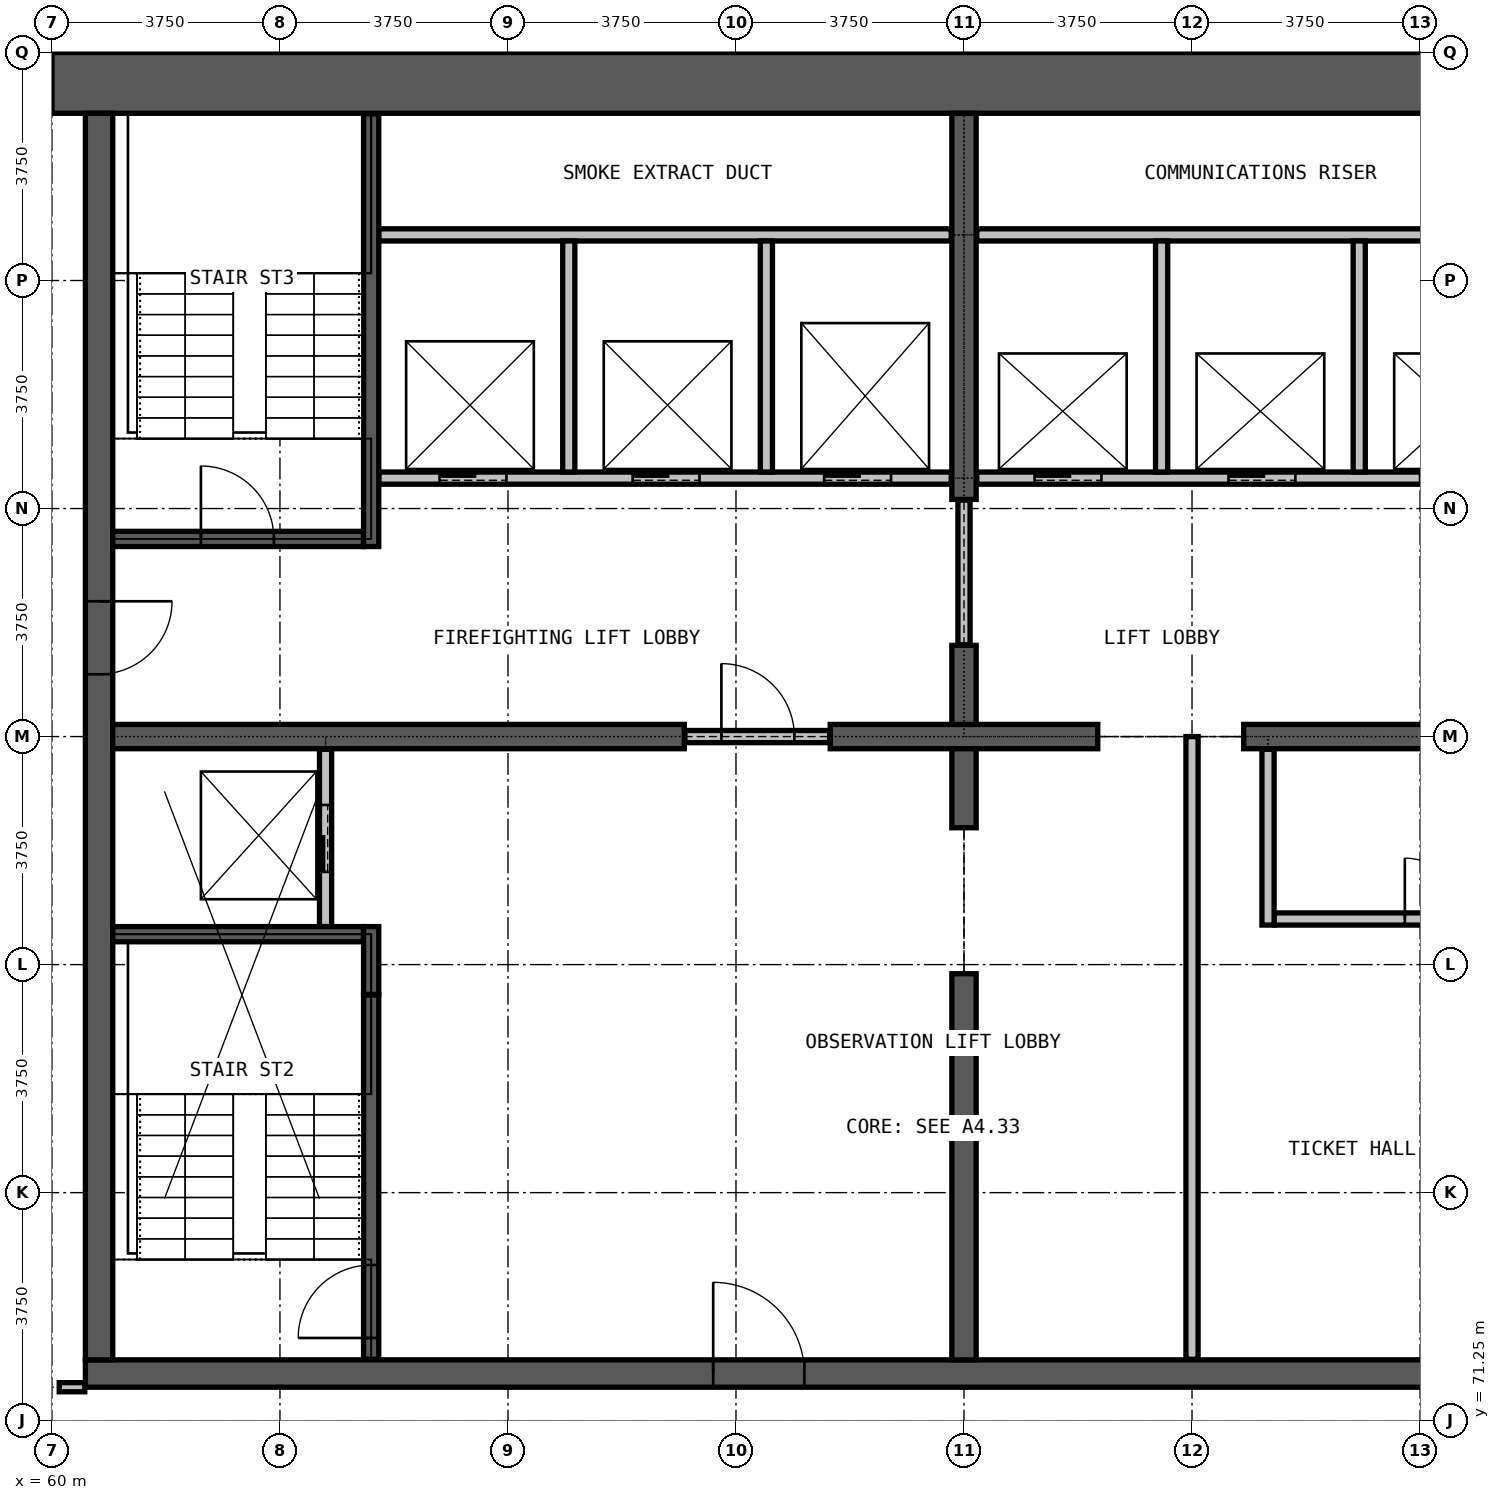
"""IFC4 building model, lengths in metres.
Left out: names, types, materials, properties, quantities, classifications, styles, units other than length and angle.
Written with IfcOpenShell. Run it as: python <this file> out.ifc"""

import sys

from ifc_helpers import new_model, si_unit, direction, frame, frame_2d, origin, place, context, subcontext, project, spatial, rectangle, extrude, element, fill, save


model = new_model("IFC4")
c1 = context("Model", 3, precision=1e-05, world=origin(), true_north=direction((0.0, 1.0)))
c2 = subcontext(c1, "Body", "Model", "MODEL_VIEW")
j1 = project(units=[si_unit("LENGTHUNIT", "METRE"), si_unit("PLANEANGLEUNIT", "RADIAN")], contexts=[c1])
p1 = place(None, origin())
s1 = spatial("IfcSite", under=j1, at=p1, CompositionType="ELEMENT")
p2 = place(p1, origin())
s2 = spatial("IfcBuilding", under=s1, at=p2, CompositionType="ELEMENT")
p3 = place(p2, frame((0.0, 0.0, 287.7)))
s3 = spatial("IfcBuildingStorey", under=s2, at=p3, CompositionType="ELEMENT", Elevation=287.7)
p4 = place(p3, frame((60.55, 72.025, 0.0), z_axis=(0.0, 0.0, 1.0), x_axis=(1.0, 0.0, 0.0)))
e1 = element("IfcWall", 1, at=p4, inside=s3, PredefinedType="SHEAR", context=c2, shape_type="SweptSolid", body=[
    extrude(rectangle(XDim=28.9, YDim=0.45, at=frame_2d((14.45, 0.0))), origin(), (0.0, 0.0, 1.0), 5.0),
])
p5 = place(p4, frame((10.325, 0.0, 0.0)))
e2 = element("IfcOpeningElement", 2, at=p5, cuts=e1, PredefinedType="OPENING", context=c2, shape_type="SweptSolid", body=[
    extrude(rectangle(XDim=1.5, YDim=2.2, at=frame_2d((0.75, 1.1))), frame((0.0, 0.235, 0.0), z_axis=(0.0, -1.0, 0.0), x_axis=(1.0, 0.0, 0.0)), (0.0, 0.0, 1.0), 0.47),
])
p6 = place(p3, frame((90.0, 93.25, 0.0), z_axis=(0.0, 0.0, 1.0), x_axis=(-1.0, 0.0, 0.0)))
e3 = element("IfcWall", 3, at=p6, inside=s3, PredefinedType="SHEAR", context=c2, shape_type="SweptSolid", body=[
    extrude(rectangle(XDim=30.0, YDim=1.0, at=frame_2d((15.0, 0.0))), origin(), (0.0, 0.0, 1.0), 5.0),
])
p7 = place(p3, frame((60.775, 92.75, 0.0), z_axis=(0.0, 0.0, 1.0), x_axis=(0.0, -1.0, 0.0)))
e4 = element("IfcWall", 4, at=p7, inside=s3, PredefinedType="SHEAR", context=c2, shape_type="SweptSolid", body=[
    extrude(rectangle(XDim=20.5, YDim=0.45, at=frame_2d((10.25, 0.0))), origin(), (0.0, 0.0, 1.0), 5.0),
])
p8 = place(p7, frame((8.025, 0.0, 0.0)))
e5 = element("IfcOpeningElement", 5, at=p8, cuts=e4, PredefinedType="OPENING", context=c2, shape_type="SweptSolid", body=[
    extrude(rectangle(XDim=1.2, YDim=2.2, at=frame_2d((0.6, 1.1))), frame((0.0, 0.235, 0.0), z_axis=(0.0, -1.0, 0.0), x_axis=(1.0, 0.0, 0.0)), (0.0, 0.0, 1.0), 0.47),
])
p9 = place(p3, frame((61.0, 82.5, 0.0), z_axis=(0.0, 0.0, 1.0), x_axis=(1.0, 0.0, 0.0)))
e6 = element("IfcWall", 6, at=p9, inside=s3, PredefinedType="SHEAR", context=c2, shape_type="SweptSolid", body=[
    extrude(rectangle(XDim=9.4, YDim=0.4, at=frame_2d((4.7, 0.0))), origin(), (0.0, 0.0, 1.0), 5.0),
])
p10 = place(p3, frame((72.8, 82.5, 0.0), z_axis=(0.0, 0.0, 1.0), x_axis=(1.0, 0.0, 0.0)))
e7 = element("IfcWall", 7, at=p10, inside=s3, PredefinedType="SHEAR", context=c2, shape_type="SweptSolid", body=[
    extrude(rectangle(XDim=4.4, YDim=0.4, at=frame_2d((2.2, 0.0))), origin(), (0.0, 0.0, 1.0), 5.0),
])
p11 = place(p3, frame((79.6, 82.5, 0.0), z_axis=(0.0, 0.0, 1.0), x_axis=(1.0, 0.0, 0.0)))
e8 = element("IfcWall", 8, at=p11, inside=s3, PredefinedType="SHEAR", context=c2, shape_type="SweptSolid", body=[
    extrude(rectangle(XDim=9.4, YDim=0.4, at=frame_2d((4.7, 0.0))), origin(), (0.0, 0.0, 1.0), 5.0),
])
p12 = place(p3, frame((75.0, 72.25, 0.0), z_axis=(0.0, 0.0, 1.0), x_axis=(0.0, 1.0, 0.0)))
e9 = element("IfcWall", 9, at=p12, inside=s3, PredefinedType="SHEAR", context=c2, shape_type="SweptSolid", body=[
    extrude(rectangle(XDim=6.35, YDim=0.4, at=frame_2d((3.175, 0.0))), origin(), (0.0, 0.0, 1.0), 5.0),
])
for number, where, z_axis, x_axis in (
    (10, (75.0, 81.0, 0.0), (0.0, 0.0, 1.0), (0.0, 1.0, 0.0)),
    (11, (75.0, 82.7, 0.0), (0.0, 0.0, 1.0), (0.0, 1.0, 0.0)),
):
    element("IfcWall", number, at=place(p3, frame(where, z_axis=z_axis, x_axis=x_axis)), inside=s3, PredefinedType="SHEAR", context=c2, shape_type="SweptSolid", body=[
        extrude(rectangle(XDim=1.3, YDim=0.4, at=frame_2d((0.65, 0.0))), origin(), (0.0, 0.0, 1.0), 5.0),
    ])
p13 = place(p3, frame((75.0, 86.4, 0.0), z_axis=(0.0, 0.0, 1.0), x_axis=(0.0, 1.0, 0.0)))
e12 = element("IfcWall", 12, at=p13, inside=s3, PredefinedType="SHEAR", context=c2, shape_type="SweptSolid", body=[
    extrude(rectangle(XDim=6.35, YDim=0.4, at=frame_2d((3.175, 0.0))), origin(), (0.0, 0.0, 1.0), 5.0),
])
p14 = place(p3, frame((80.1, 79.5, 0.0), z_axis=(0.0, 0.0, 1.0), x_axis=(1.0, 0.0, 0.0)))
e13 = element("IfcWall", 13, at=p14, inside=s3, PredefinedType="PARTITIONING", context=c2, shape_type="SweptSolid", body=[
    extrude(rectangle(XDim=5.3, YDim=0.2, at=frame_2d((2.65, 0.0))), origin(), (0.0, 0.0, 1.0), 4.65),
])
p15 = place(p14, frame((2.15, 0.0, 0.0)))
e14 = element("IfcOpeningElement", 14, at=p15, cuts=e13, PredefinedType="OPENING", context=c2, shape_type="SweptSolid", body=[
    extrude(rectangle(XDim=1.0, YDim=2.2, at=frame_2d((0.5, 1.1))), frame((0.0, 0.11, 0.0), z_axis=(0.0, -1.0, 0.0), x_axis=(1.0, 0.0, 0.0)), (0.0, 0.0, 1.0), 0.22),
])
p16 = place(p3, frame((70.41, 82.5, 0.0), z_axis=(0.0, 0.0, 1.0), x_axis=(1.0, 0.0, 0.0)))
e15 = element("IfcWall", 15, at=p16, inside=s3, PredefinedType="PARTITIONING", context=c2, shape_type="SweptSolid", body=[
    extrude(rectangle(XDim=2.38, YDim=0.2, at=frame_2d((1.19, 0.0))), origin(), (0.0, 0.0, 1.0), 2.4),
])
p17 = place(p16, frame((0.6, 0.0, 0.0)))
e16 = element("IfcOpeningElement", 16, at=p17, cuts=e15, PredefinedType="OPENING", context=c2, shape_type="SweptSolid", body=[
    extrude(rectangle(XDim=1.2, YDim=2.2, at=frame_2d((0.6, 1.1))), frame((0.0, 0.11, 0.0), z_axis=(0.0, -1.0, 0.0), x_axis=(1.0, 0.0, 0.0)), (0.0, 0.0, 1.0), 0.22),
])
p18 = place(p3, frame((75.0, 84.01, 0.0), z_axis=(0.0, 0.0, 1.0), x_axis=(0.0, 1.0, 0.0)))
e17 = element("IfcWall", 17, at=p18, inside=s3, PredefinedType="PARTITIONING", context=c2, shape_type="SweptSolid", body=[
    extrude(rectangle(XDim=2.38, YDim=0.2, at=frame_2d((1.19, 0.0))), origin(), (0.0, 0.0, 1.0), 2.4),
])
p19 = place(p3, frame((78.75, 72.26, 0.0), z_axis=(0.0, 0.0, 1.0), x_axis=(0.0, 1.0, 0.0)))
e18 = element("IfcWall", 18, at=p19, inside=s3, PredefinedType="PARTITIONING", context=c2, shape_type="SweptSolid", body=[
    extrude(rectangle(XDim=10.24, YDim=0.2, at=frame_2d((5.12, 0.0))), origin(), (0.0, 0.0, 1.0), 4.65),
])
p20 = place(p3, frame((80.0, 79.4, 0.0), z_axis=(0.0, 0.0, 1.0), x_axis=(0.0, 1.0, 0.0)))
e19 = element("IfcWall", 19, at=p20, inside=s3, PredefinedType="PARTITIONING", context=c2, shape_type="SweptSolid", body=[
    extrude(rectangle(XDim=2.89, YDim=0.2, at=frame_2d((1.445, 0.0))), origin(), (0.0, 0.0, 1.0), 4.65),
])
p21 = place(p3, frame((60.12, 71.8, 0.0), z_axis=(0.0, 0.0, 1.0), x_axis=(1.0, 0.0, 0.0)))
e20 = element("IfcWall", 20, at=p21, inside=s3, PredefinedType="PARTITIONING", context=c2, shape_type="SweptSolid", body=[
    extrude(rectangle(XDim=0.42, YDim=0.15, at=frame_2d((0.21, 0.0))), origin(), (0.0, 0.0, 1.0), 4.65),
])
p22 = place(p3, frame((65.375, 86.75, 0.0), z_axis=(0.0, 0.0, 1.0), x_axis=(1.0, 0.0, 0.0)))
e21 = element("IfcWall", 21, at=p22, inside=s3, PredefinedType="PARTITIONING", context=c2, shape_type="SweptSolid", body=[
    extrude(rectangle(XDim=9.415, YDim=0.2, at=frame_2d((4.708, 0.0))), origin(), (0.0, 0.0, 1.0), 4.65),
])
p23 = place(p22, frame((1.0, 0.0, 0.0)))
e22 = element("IfcOpeningElement", 22, at=p23, cuts=e21, PredefinedType="OPENING", context=c2, shape_type="SweptSolid", body=[
    extrude(rectangle(XDim=1.1, YDim=2.2, at=frame_2d((0.55, 1.1))), frame((0.0, 0.11, 0.0), z_axis=(0.0, -1.0, 0.0), x_axis=(1.0, 0.0, 0.0)), (0.0, 0.0, 1.0), 0.22),
])
p24 = place(p22, frame((4.175, 0.0, 0.0)))
e23 = element("IfcOpeningElement", 23, at=p24, cuts=e21, PredefinedType="OPENING", context=c2, shape_type="SweptSolid", body=[
    extrude(rectangle(XDim=1.1, YDim=2.2, at=frame_2d((0.55, 1.1))), frame((0.0, 0.11, 0.0), z_axis=(0.0, -1.0, 0.0), x_axis=(1.0, 0.0, 0.0)), (0.0, 0.0, 1.0), 0.22),
])
p25 = place(p22, frame((7.325, 0.0, 0.0)))
e24 = element("IfcOpeningElement", 24, at=p25, cuts=e21, PredefinedType="OPENING", context=c2, shape_type="SweptSolid", body=[
    extrude(rectangle(XDim=1.1, YDim=2.2, at=frame_2d((0.55, 1.1))), frame((0.0, 0.11, 0.0), z_axis=(0.0, -1.0, 0.0), x_axis=(1.0, 0.0, 0.0)), (0.0, 0.0, 1.0), 0.22),
])
p26 = place(p3, frame((75.21, 86.75, 0.0), z_axis=(0.0, 0.0, 1.0), x_axis=(1.0, 0.0, 0.0)))
e25 = element("IfcWall", 25, at=p26, inside=s3, PredefinedType="PARTITIONING", context=c2, shape_type="SweptSolid", body=[
    extrude(rectangle(XDim=9.415, YDim=0.2, at=frame_2d((4.708, 0.0))), origin(), (0.0, 0.0, 1.0), 4.65),
])
p27 = place(p26, frame((0.95, 0.0, 0.0)))
e26 = element("IfcOpeningElement", 26, at=p27, cuts=e25, PredefinedType="OPENING", context=c2, shape_type="SweptSolid", body=[
    extrude(rectangle(XDim=1.1, YDim=2.2, at=frame_2d((0.55, 1.1))), frame((0.0, 0.11, 0.0), z_axis=(0.0, -1.0, 0.0), x_axis=(1.0, 0.0, 0.0)), (0.0, 0.0, 1.0), 0.22),
])
p28 = place(p26, frame((4.14, 0.0, 0.0)))
e27 = element("IfcOpeningElement", 27, at=p28, cuts=e25, PredefinedType="OPENING", context=c2, shape_type="SweptSolid", body=[
    extrude(rectangle(XDim=1.1, YDim=2.2, at=frame_2d((0.55, 1.1))), frame((0.0, 0.11, 0.0), z_axis=(0.0, -1.0, 0.0), x_axis=(1.0, 0.0, 0.0)), (0.0, 0.0, 1.0), 0.22),
])
p29 = place(p26, frame((7.29, 0.0, 0.0)))
e28 = element("IfcOpeningElement", 28, at=p29, cuts=e25, PredefinedType="OPENING", context=c2, shape_type="SweptSolid", body=[
    extrude(rectangle(XDim=1.1, YDim=2.2, at=frame_2d((0.55, 1.1))), frame((0.0, 0.11, 0.0), z_axis=(0.0, -1.0, 0.0), x_axis=(1.0, 0.0, 0.0)), (0.0, 0.0, 1.0), 0.22),
])
for number, where, z_axis, x_axis in (
    (29, (65.375, 90.75, 0.0), (0.0, 0.0, 1.0), (1.0, 0.0, 0.0)),
    (30, (75.21, 90.75, 0.0), (0.0, 0.0, 1.0), (1.0, 0.0, 0.0)),
):
    element("IfcWall", number, at=place(p3, frame(where, z_axis=z_axis, x_axis=x_axis)), inside=s3, PredefinedType="PARTITIONING", context=c2, shape_type="SweptSolid", body=[
        extrude(rectangle(XDim=9.415, YDim=0.2, at=frame_2d((4.708, 0.0))), origin(), (0.0, 0.0, 1.0), 4.65),
    ])
p30 = place(p3, frame((64.5, 79.375, 0.0), z_axis=(0.0, 0.0, 1.0), x_axis=(0.0, 1.0, 0.0)))
e31 = element("IfcWall", 31, at=p30, inside=s3, PredefinedType="PARTITIONING", context=c2, shape_type="SweptSolid", body=[
    extrude(rectangle(XDim=2.915, YDim=0.2, at=frame_2d((1.458, 0.0))), origin(), (0.0, 0.0, 1.0), 4.65),
])
p31 = place(p30, frame((0.9, 0.0, 0.0)))
e32 = element("IfcOpeningElement", 32, at=p31, cuts=e31, PredefinedType="OPENING", context=c2, shape_type="SweptSolid", body=[
    extrude(rectangle(XDim=1.1, YDim=2.2, at=frame_2d((0.55, 1.1))), frame((0.0, 0.11, 0.0), z_axis=(0.0, -1.0, 0.0), x_axis=(1.0, 0.0, 0.0)), (0.0, 0.0, 1.0), 0.22),
])
for number, where, z_axis, x_axis in (
    (33, (68.5, 86.85, 0.0), (0.0, 0.0, 1.0), (0.0, 1.0, 0.0)),
    (34, (71.75, 86.85, 0.0), (0.0, 0.0, 1.0), (0.0, 1.0, 0.0)),
    (35, (78.25, 86.85, 0.0), (0.0, 0.0, 1.0), (0.0, 1.0, 0.0)),
    (36, (81.5, 86.85, 0.0), (0.0, 0.0, 1.0), (0.0, 1.0, 0.0)),
):
    element("IfcWall", number, at=place(p3, frame(where, z_axis=z_axis, x_axis=x_axis)), inside=s3, PredefinedType="PARTITIONING", context=c2, shape_type="SweptSolid", body=[
        extrude(rectangle(XDim=3.8, YDim=0.2, at=frame_2d((1.9, 0.0))), origin(), (0.0, 0.0, 1.0), 4.65),
    ])
p32 = place(p3, frame((61.0, 79.25, 0.0), z_axis=(0.0, 0.0, 1.0), x_axis=(1.0, 0.0, 0.0)))
e37 = element("IfcWall", 37, at=p32, inside=s3, PredefinedType="PARTITIONING", context=c2, shape_type="SweptSolid", body=[
    extrude(rectangle(XDim=4.125, YDim=0.25, at=frame_2d((2.062, 0.0))), origin(), (0.0, 0.0, 1.0), 4.65),
])
p33 = place(p3, frame((61.0, 85.75, 0.0), z_axis=(0.0, 0.0, 1.0), x_axis=(1.0, 0.0, 0.0)))
e38 = element("IfcWall", 38, at=p33, inside=s3, PredefinedType="PARTITIONING", context=c2, shape_type="SweptSolid", body=[
    extrude(rectangle(XDim=4.125, YDim=0.25, at=frame_2d((2.062, 0.0))), origin(), (0.0, 0.0, 1.0), 4.65),
])
p34 = place(p33, frame((1.45, 0.0, 0.0)))
e39 = element("IfcOpeningElement", 39, at=p34, cuts=e38, PredefinedType="OPENING", context=c2, shape_type="SweptSolid", body=[
    extrude(rectangle(XDim=1.2, YDim=2.2, at=frame_2d((0.6, 1.1))), frame((0.0, 0.135, 0.0), z_axis=(0.0, -1.0, 0.0), x_axis=(1.0, 0.0, 0.0)), (0.0, 0.0, 1.0), 0.27),
])
p35 = place(p3, frame((65.25, 72.26, 0.0), z_axis=(0.0, 0.0, 1.0), x_axis=(0.0, 1.0, 0.0)))
e40 = element("IfcWall", 40, at=p35, inside=s3, PredefinedType="PARTITIONING", context=c2, shape_type="SweptSolid", body=[
    extrude(rectangle(XDim=5.99, YDim=0.25, at=frame_2d((2.995, 0.0))), origin(), (0.0, 0.0, 1.0), 4.65),
])
p36 = place(p35, frame((0.35, 0.0, 0.0)))
e41 = element("IfcOpeningElement", 41, at=p36, cuts=e40, PredefinedType="OPENING", context=c2, shape_type="SweptSolid", body=[
    extrude(rectangle(XDim=1.2, YDim=2.2, at=frame_2d((0.6, 1.1))), frame((0.0, 0.135, 0.0), z_axis=(0.0, -1.0, 0.0), x_axis=(1.0, 0.0, 0.0)), (0.0, 0.0, 1.0), 0.27),
])
p37 = place(p3, frame((65.25, 78.26, 0.0), z_axis=(0.0, 0.0, 1.0), x_axis=(0.0, 1.0, 0.0)))
e42 = element("IfcWall", 42, at=p37, inside=s3, PredefinedType="PARTITIONING", context=c2, shape_type="SweptSolid", body=[
    extrude(rectangle(XDim=1.115, YDim=0.25, at=frame_2d((0.558, 0.0))), origin(), (0.0, 0.0, 1.0), 4.65),
])
p38 = place(p3, frame((65.25, 85.625, 0.0), z_axis=(0.0, 0.0, 1.0), x_axis=(0.0, 1.0, 0.0)))
e43 = element("IfcWall", 43, at=p38, inside=s3, PredefinedType="PARTITIONING", context=c2, shape_type="SweptSolid", body=[
    extrude(rectangle(XDim=7.115, YDim=0.25, at=frame_2d((3.558, 0.0))), origin(), (0.0, 0.0, 1.0), 4.65),
])
p39 = place(p27, origin())
e44 = element("IfcDoor", 44, at=p39, inside=s3, OperationType="DOUBLE_DOOR_SLIDING", PredefinedType="DOOR", context=c2, shape_type="SweptSolid", body=[
    extrude(rectangle(XDim=1.1, YDim=2.2, at=frame_2d((0.55, 1.1))), frame((0.0, 0.025, 0.0), z_axis=(0.0, -1.0, 0.0), x_axis=(1.0, 0.0, 0.0)), (0.0, 0.0, 1.0), 0.05),
])
fill(e26, e44)
p40 = place(p28, origin())
e45 = element("IfcDoor", 45, at=p40, inside=s3, OperationType="DOUBLE_DOOR_SLIDING", PredefinedType="DOOR", context=c2, shape_type="SweptSolid", body=[
    extrude(rectangle(XDim=1.1, YDim=2.2, at=frame_2d((0.55, 1.1))), frame((0.0, 0.025, 0.0), z_axis=(0.0, -1.0, 0.0), x_axis=(1.0, 0.0, 0.0)), (0.0, 0.0, 1.0), 0.05),
])
fill(e27, e45)
p41 = place(p23, origin())
e46 = element("IfcDoor", 46, at=p41, inside=s3, OperationType="DOUBLE_DOOR_SLIDING", PredefinedType="DOOR", context=c2, shape_type="SweptSolid", body=[
    extrude(rectangle(XDim=1.1, YDim=2.2, at=frame_2d((0.55, 1.1))), frame((0.0, 0.025, 0.0), z_axis=(0.0, -1.0, 0.0), x_axis=(1.0, 0.0, 0.0)), (0.0, 0.0, 1.0), 0.05),
])
fill(e22, e46)
p42 = place(p24, origin())
e47 = element("IfcDoor", 47, at=p42, inside=s3, OperationType="DOUBLE_DOOR_SLIDING", PredefinedType="DOOR", context=c2, shape_type="SweptSolid", body=[
    extrude(rectangle(XDim=1.1, YDim=2.2, at=frame_2d((0.55, 1.1))), frame((0.0, 0.025, 0.0), z_axis=(0.0, -1.0, 0.0), x_axis=(1.0, 0.0, 0.0)), (0.0, 0.0, 1.0), 0.05),
])
fill(e23, e47)
p43 = place(p25, origin())
e48 = element("IfcDoor", 48, at=p43, inside=s3, OperationType="DOUBLE_DOOR_SLIDING", PredefinedType="DOOR", context=c2, shape_type="SweptSolid", body=[
    extrude(rectangle(XDim=1.1, YDim=2.2, at=frame_2d((0.55, 1.1))), frame((0.0, 0.025, 0.0), z_axis=(0.0, -1.0, 0.0), x_axis=(1.0, 0.0, 0.0)), (0.0, 0.0, 1.0), 0.05),
])
fill(e24, e48)
p44 = place(p31, origin())
e49 = element("IfcDoor", 49, at=p44, inside=s3, OperationType="DOUBLE_DOOR_SLIDING", PredefinedType="DOOR", context=c2, shape_type="SweptSolid", body=[
    extrude(rectangle(XDim=1.1, YDim=2.2, at=frame_2d((0.55, 1.1))), frame((0.0, 0.025, 0.0), z_axis=(0.0, -1.0, 0.0), x_axis=(1.0, 0.0, 0.0)), (0.0, 0.0, 1.0), 0.05),
])
fill(e32, e49)
p45 = place(p17, origin())
e50 = element("IfcDoor", 50, at=p45, inside=s3, OperationType="SINGLE_SWING_RIGHT", PredefinedType="DOOR", context=c2, shape_type="SweptSolid", body=[
    extrude(rectangle(XDim=1.2, YDim=2.2, at=frame_2d((0.6, 1.1))), frame((0.0, 0.025, 0.0), z_axis=(0.0, -1.0, 0.0), x_axis=(1.0, 0.0, 0.0)), (0.0, 0.0, 1.0), 0.05),
])
fill(e16, e50)
p46 = place(p34, origin())
e51 = element("IfcDoor", 51, at=p46, inside=s3, OperationType="SINGLE_SWING_LEFT", PredefinedType="DOOR", context=c2, shape_type="SweptSolid", body=[
    extrude(rectangle(XDim=1.2, YDim=2.2, at=frame_2d((0.6, 1.1))), frame((0.0, 0.025, 0.0), z_axis=(0.0, -1.0, 0.0), x_axis=(1.0, 0.0, 0.0)), (0.0, 0.0, 1.0), 0.05),
])
fill(e39, e51)
p47 = place(p36, origin())
e52 = element("IfcDoor", 52, at=p47, inside=s3, OperationType="SINGLE_SWING_LEFT", PredefinedType="DOOR", context=c2, shape_type="SweptSolid", body=[
    extrude(rectangle(XDim=1.2, YDim=2.2, at=frame_2d((0.6, 1.1))), frame((0.0, 0.025, 0.0), z_axis=(0.0, -1.0, 0.0), x_axis=(1.0, 0.0, 0.0)), (0.0, 0.0, 1.0), 0.05),
])
fill(e41, e52)
p48 = place(p5, origin())
e53 = element("IfcDoor", 53, at=p48, inside=s3, OperationType="DOUBLE_DOOR_SINGLE_SWING", PredefinedType="DOOR", context=c2, shape_type="SweptSolid", body=[
    extrude(rectangle(XDim=1.5, YDim=2.2, at=frame_2d((0.75, 1.1))), frame((0.0, 0.025, 0.0), z_axis=(0.0, -1.0, 0.0), x_axis=(1.0, 0.0, 0.0)), (0.0, 0.0, 1.0), 0.05),
])
fill(e2, e53)
p49 = place(p15, origin())
e54 = element("IfcDoor", 54, at=p49, inside=s3, OperationType="SINGLE_SWING_RIGHT", PredefinedType="DOOR", context=c2, shape_type="SweptSolid", body=[
    extrude(rectangle(XDim=1.0, YDim=2.2, at=frame_2d((0.5, 1.1))), frame((0.0, 0.025, 0.0), z_axis=(0.0, -1.0, 0.0), x_axis=(1.0, 0.0, 0.0)), (0.0, 0.0, 1.0), 0.05),
])
fill(e14, e54)
p50 = place(p8, origin())
e55 = element("IfcDoor", 55, at=p50, inside=s3, OperationType="SINGLE_SWING_LEFT", PredefinedType="DOOR", context=c2, shape_type="SweptSolid", body=[
    extrude(rectangle(XDim=1.2, YDim=2.2, at=frame_2d((0.6, 1.1))), frame((0.0, 0.025, 0.0), z_axis=(0.0, -1.0, 0.0), x_axis=(1.0, 0.0, 0.0)), (0.0, 0.0, 1.0), 0.05),
])
fill(e5, e55)
save(model, sys.argv[1])
